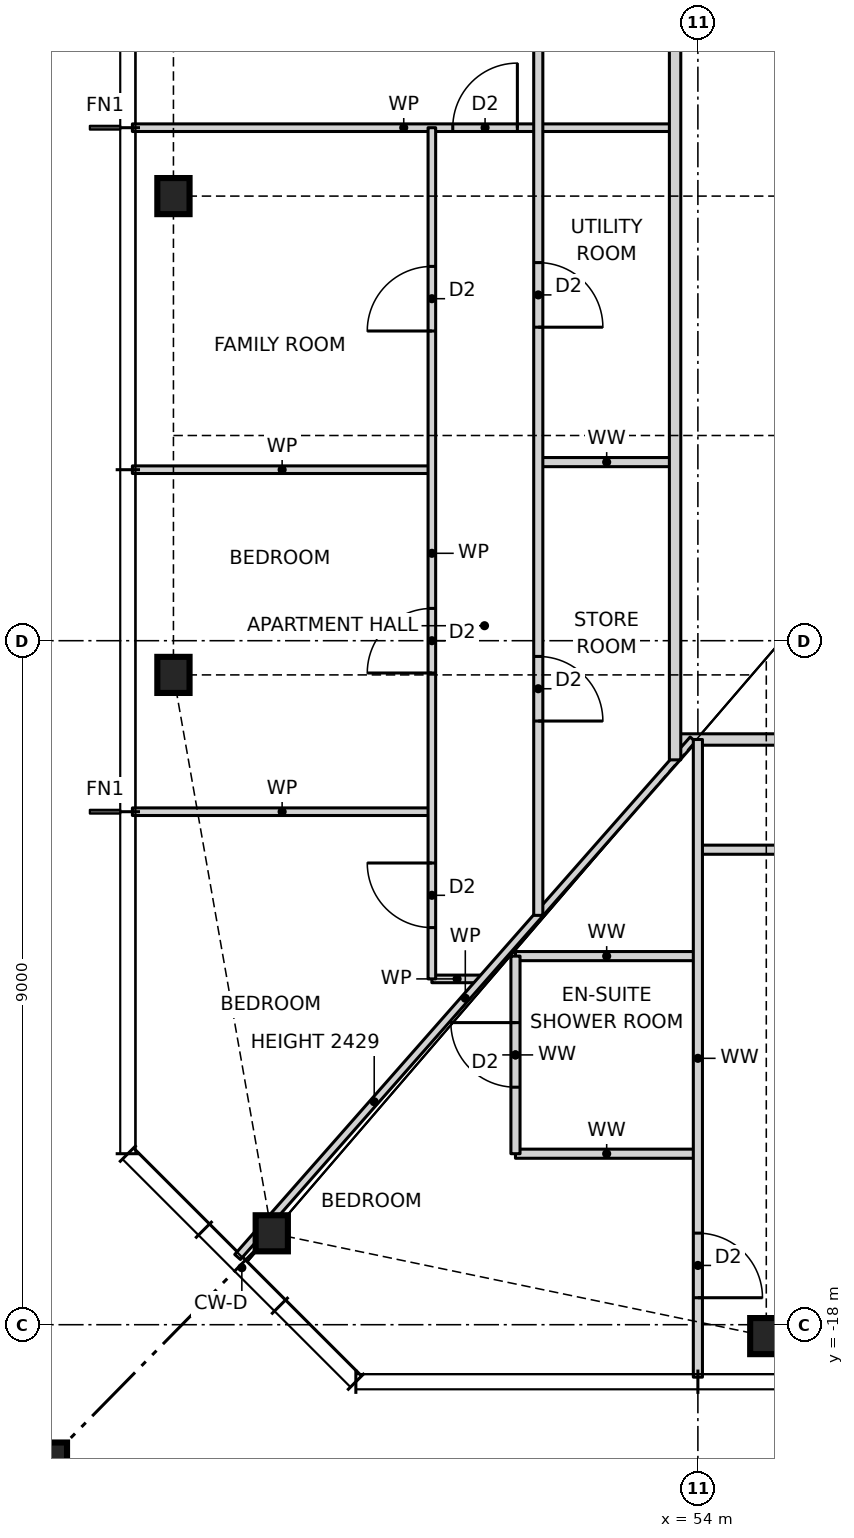
"""IFC4 building model, lengths in metres.
Left out: names, types, materials, properties, quantities, classifications, styles, units other than length and angle.
Written with IfcOpenShell. Run it as: python <this file> out.ifc"""

import sys

from ifc_helpers import new_model, si_unit, direction, frame, frame_2d, origin, origin_2d, place, context, subcontext, project, spatial, rectangle, hollow_rectangle, i_section, extrude, element, fill, save


model = new_model("IFC4")
c1 = context("Model", 3, precision=1e-05, world=origin(), true_north=direction((0.0, 1.0)))
c2 = subcontext(c1, "Body", "Model", "MODEL_VIEW")
j1 = project(units=[si_unit("LENGTHUNIT", "METRE"), si_unit("PLANEANGLEUNIT", "RADIAN")], contexts=[c1])
p1 = place(None, origin())
s1 = spatial("IfcSite", under=j1, at=p1, CompositionType="ELEMENT")
p2 = place(p1, origin())
s2 = spatial("IfcBuilding", under=s1, at=p2, CompositionType="ELEMENT")
p3 = place(p2, frame((0.0, 0.0, 29.0)))
s3 = spatial("IfcBuildingStorey", under=s2, at=p3, CompositionType="ELEMENT", Elevation=29.0)
for number, where, z_axis, x_axis in (
    (1, (48.394, -16.797, 0.0), (0.0, 0.0, 1.0), (1.0, 0.0, 0.0)),
    (2, (54.9, -18.15, 0.0), (0.0, 0.0, 1.0), (1.0, 0.0, 0.0)),
    (3, (47.1, -3.15, 0.0), (0.0, 0.0, 1.0), (1.0, 0.0, 0.0)),
    (4, (47.1, -9.45, 0.0), (0.0, 0.0, 1.0), (1.0, 0.0, 0.0)),
):
    element("IfcColumn", number, at=place(p3, frame(where, z_axis=z_axis, x_axis=x_axis)), inside=s3, PredefinedType="COLUMN", context=c2, shape_type="SweptSolid", body=[
        extrude(i_section(OverallWidth=0.424, OverallDepth=0.475, WebThickness=0.048, FlangeThickness=0.077, at=origin_2d()), origin(), (0.0, 0.0, 1.0), 3.5),
    ])
p4 = place(p3, frame((45.1, -20.15, 0.0), z_axis=(0.0, 0.0, 1.0), x_axis=(1.0, 0.0, 0.0)))
e5 = element("IfcColumn", 5, at=p4, inside=s3, PredefinedType="COLUMN", context=c2, shape_type="SweptSolid", body=[
    extrude(hollow_rectangle(XDim=1.2, YDim=1.2, WallThickness=0.07, at=origin_2d()), origin(), (0.0, 0.0, 1.0), 3.5),
])
p5 = place(p3, frame((51.6, -15.75, 0.0), z_axis=(0.0, 0.0, 1.0), x_axis=(1.0, 0.0, 0.0)))
e6 = element("IfcWall", 6, at=p5, inside=s3, PredefinedType="PARTITIONING", context=c2, shape_type="SweptSolid", body=[
    extrude(rectangle(XDim=2.4, YDim=0.12, at=frame_2d((1.2, 0.0))), origin(), (0.0, 0.0, 1.0), 3.27),
])
p6 = place(p3, frame((50.5, -13.45, 0.0), z_axis=(0.0, 0.0, 1.0), x_axis=(1.0, 0.0, 0.0)))
e7 = element("IfcWall", 7, at=p6, inside=s3, PredefinedType="PARTITIONING", context=c2, shape_type="SweptSolid", body=[
    extrude(rectangle(XDim=0.664, YDim=0.1, at=frame_2d((0.332, 0.0))), origin(), (0.0, 0.0, 1.0), 3.27),
])
p7 = place(p3, frame((51.6, -13.15, 0.0), z_axis=(0.0, 0.0, 1.0), x_axis=(1.0, 0.0, 0.0)))
e8 = element("IfcWall", 8, at=p7, inside=s3, PredefinedType="PARTITIONING", context=c2, shape_type="SweptSolid", body=[
    extrude(rectangle(XDim=2.4, YDim=0.12, at=frame_2d((1.2, 0.0))), origin(), (0.0, 0.0, 1.0), 3.27),
])
p8 = place(p3, frame((54.0, -11.75, 0.0), z_axis=(0.0, 0.0, 1.0), x_axis=(1.0, 0.0, 0.0)))
e9 = element("IfcWall", 9, at=p8, inside=s3, PredefinedType="PARTITIONING", context=c2, shape_type="SweptSolid", body=[
    extrude(rectangle(XDim=19.34, YDim=0.12, at=frame_2d((9.67, 0.0))), origin(), (0.0, 0.0, 1.0), 3.27),
])
p9 = place(p8, frame((1.375, 0.0, 0.0)))
e10 = element("IfcOpeningElement", 10, at=p9, cuts=e9, PredefinedType="OPENING", context=c2, shape_type="SweptSolid", body=[
    extrude(rectangle(XDim=0.85, YDim=2.1, at=frame_2d((0.425, 1.05))), frame((0.0, 0.07, 0.0), z_axis=(0.0, -1.0, 0.0), x_axis=(1.0, 0.0, 0.0)), (0.0, 0.0, 1.0), 0.14),
])
p10 = place(p8, frame((4.575, 0.0, 0.0)))
e11 = element("IfcOpeningElement", 11, at=p10, cuts=e9, PredefinedType="OPENING", context=c2, shape_type="SweptSolid", body=[
    extrude(rectangle(XDim=0.85, YDim=2.1, at=frame_2d((0.425, 1.05))), frame((0.0, 0.07, 0.0), z_axis=(0.0, -1.0, 0.0), x_axis=(1.0, 0.0, 0.0)), (0.0, 0.0, 1.0), 0.14),
])
p11 = place(p8, frame((11.325, 0.0, 0.0)))
e12 = element("IfcOpeningElement", 12, at=p11, cuts=e9, PredefinedType="OPENING", context=c2, shape_type="SweptSolid", body=[
    extrude(rectangle(XDim=0.85, YDim=2.1, at=frame_2d((0.425, 1.05))), frame((0.0, 0.07, 0.0), z_axis=(0.0, -1.0, 0.0), x_axis=(1.0, 0.0, 0.0)), (0.0, 0.0, 1.0), 0.14),
])
p12 = place(p8, frame((16.495, 0.0, 0.0)))
e13 = element("IfcOpeningElement", 13, at=p12, cuts=e9, PredefinedType="OPENING", context=c2, shape_type="SweptSolid", body=[
    extrude(rectangle(XDim=0.85, YDim=2.1, at=frame_2d((0.425, 1.05))), frame((0.0, 0.07, 0.0), z_axis=(0.0, -1.0, 0.0), x_axis=(1.0, 0.0, 0.0)), (0.0, 0.0, 1.0), 0.14),
])
p13 = place(p3, frame((46.56, -11.25, 0.0), z_axis=(0.0, 0.0, 1.0), x_axis=(1.0, 0.0, 0.0)))
e14 = element("IfcWall", 14, at=p13, inside=s3, PredefinedType="PARTITIONING", context=c2, shape_type="SweptSolid", body=[
    extrude(rectangle(XDim=3.94, YDim=0.1, at=frame_2d((1.97, 0.0))), origin(), (0.0, 0.0, 1.0), 3.27),
])
p14 = place(p3, frame((53.7, -10.3, 0.0), z_axis=(0.0, 0.0, 1.0), x_axis=(1.0, 0.0, 0.0)))
e15 = element("IfcWall", 15, at=p14, inside=s3, PredefinedType="PARTITIONING", context=c2, shape_type="SweptSolid", body=[
    extrude(rectangle(XDim=18.6, YDim=0.15, at=frame_2d((9.3, 0.0))), origin(), (0.0, 0.0, 1.0), 3.27),
])
p15 = place(p14, frame((4.8, 0.0, 0.0)))
e16 = element("IfcOpeningElement", 16, at=p15, cuts=e15, PredefinedType="OPENING", context=c2, shape_type="SweptSolid", body=[
    extrude(rectangle(XDim=1.0, YDim=2.1, at=frame_2d((0.5, 1.05))), frame((0.0, 0.085, 0.0), z_axis=(0.0, -1.0, 0.0), x_axis=(1.0, 0.0, 0.0)), (0.0, 0.0, 1.0), 0.17),
])
p16 = place(p3, frame((46.56, -6.75, 0.0), z_axis=(0.0, 0.0, 1.0), x_axis=(1.0, 0.0, 0.0)))
e17 = element("IfcWall", 17, at=p16, inside=s3, PredefinedType="PARTITIONING", context=c2, shape_type="SweptSolid", body=[
    extrude(rectangle(XDim=3.94, YDim=0.1, at=frame_2d((1.97, 0.0))), origin(), (0.0, 0.0, 1.0), 3.27),
])
p17 = place(p3, frame((51.9, -6.65, 0.0), z_axis=(0.0, 0.0, 1.0), x_axis=(1.0, 0.0, 0.0)))
e18 = element("IfcWall", 18, at=p17, inside=s3, PredefinedType="PARTITIONING", context=c2, shape_type="SweptSolid", body=[
    extrude(rectangle(XDim=1.8, YDim=0.12, at=frame_2d((0.9, 0.0))), origin(), (0.0, 0.0, 1.0), 3.27),
])
p18 = place(p3, frame((46.56, -2.25, 0.0), z_axis=(0.0, 0.0, 1.0), x_axis=(1.0, 0.0, 0.0)))
e19 = element("IfcWall", 19, at=p18, inside=s3, PredefinedType="PARTITIONING", context=c2, shape_type="SweptSolid", body=[
    extrude(rectangle(XDim=7.14, YDim=0.1, at=frame_2d((3.57, 0.0))), origin(), (0.0, 0.0, 1.0), 3.27),
])
p19 = place(p18, frame((4.215, 0.0, 0.0)))
e20 = element("IfcOpeningElement", 20, at=p19, cuts=e19, PredefinedType="OPENING", context=c2, shape_type="SweptSolid", body=[
    extrude(rectangle(XDim=0.85, YDim=2.1, at=frame_2d((0.425, 1.05))), frame((0.0, 0.06, 0.0), z_axis=(0.0, -1.0, 0.0), x_axis=(1.0, 0.0, 0.0)), (0.0, 0.0, 1.0), 0.12),
])
p20 = place(p3, frame((47.944, -17.109, 0.0), z_axis=(0.0, 0.0, 1.0), x_axis=(0.660638210404, 0.750704439146, 0.0)))
e21 = element("IfcWall", 21, at=p20, inside=s3, PredefinedType="PARTITIONING", context=c2, shape_type="SweptSolid", body=[
    extrude(rectangle(XDim=9.07, YDim=0.1, at=frame_2d((4.535, 0.0))), origin(), (0.0, 0.0, 1.0), 2.429),
])
p21 = place(p3, frame((54.0, -18.69, 0.0), z_axis=(0.0, 0.0, 1.0), x_axis=(0.0, 1.0, 0.0)))
e22 = element("IfcWall", 22, at=p21, inside=s3, PredefinedType="PARTITIONING", context=c2, shape_type="SweptSolid", body=[
    extrude(rectangle(XDim=8.39, YDim=0.12, at=frame_2d((4.195, 0.0))), origin(), (0.0, 0.0, 1.0), 3.27),
])
p22 = place(p21, frame((1.045, 0.0, 0.0)))
e23 = element("IfcOpeningElement", 23, at=p22, cuts=e22, PredefinedType="OPENING", context=c2, shape_type="SweptSolid", body=[
    extrude(rectangle(XDim=0.85, YDim=2.1, at=frame_2d((0.425, 1.05))), frame((0.0, 0.07, 0.0), z_axis=(0.0, -1.0, 0.0), x_axis=(1.0, 0.0, 0.0)), (0.0, 0.0, 1.0), 0.14),
])
p23 = place(p3, frame((53.7, -10.568, 0.0), z_axis=(0.0, 0.0, 1.0), x_axis=(0.0, 1.0, 0.0)))
e24 = element("IfcWall", 24, at=p23, inside=s3, PredefinedType="PARTITIONING", context=c2, shape_type="SweptSolid", body=[
    extrude(rectangle(XDim=21.136, YDim=0.15, at=frame_2d((10.568, 0.0))), origin(), (0.0, 0.0, 1.0), 3.27),
])
p24 = place(p23, frame((11.818, 0.0, 0.0)))
e25 = element("IfcOpeningElement", 25, at=p24, cuts=e24, PredefinedType="OPENING", context=c2, shape_type="SweptSolid", body=[
    extrude(rectangle(XDim=1.0, YDim=2.1, at=frame_2d((0.5, 1.05))), frame((0.0, 0.085, 0.0), z_axis=(0.0, -1.0, 0.0), x_axis=(1.0, 0.0, 0.0)), (0.0, 0.0, 1.0), 0.17),
])
p25 = place(p3, frame((51.9, -12.614, 0.0), z_axis=(0.0, 0.0, 1.0), x_axis=(0.0, 1.0, 0.0)))
e26 = element("IfcWall", 26, at=p25, inside=s3, PredefinedType="PARTITIONING", context=c2, shape_type="SweptSolid", body=[
    extrude(rectangle(XDim=25.228, YDim=0.12, at=frame_2d((12.614, 0.0))), origin(), (0.0, 0.0, 1.0), 3.27),
])
p26 = place(p25, frame((17.139, 0.0, 0.0)))
e27 = element("IfcOpeningElement", 27, at=p26, cuts=e26, PredefinedType="OPENING", context=c2, shape_type="SweptSolid", body=[
    extrude(rectangle(XDim=0.85, YDim=2.1, at=frame_2d((0.425, 1.05))), frame((0.0, 0.07, 0.0), z_axis=(0.0, -1.0, 0.0), x_axis=(1.0, 0.0, 0.0)), (0.0, 0.0, 1.0), 0.14),
])
p27 = place(p25, frame((13.939, 0.0, 0.0)))
e28 = element("IfcOpeningElement", 28, at=p27, cuts=e26, PredefinedType="OPENING", context=c2, shape_type="SweptSolid", body=[
    extrude(rectangle(XDim=0.85, YDim=2.1, at=frame_2d((0.425, 1.05))), frame((0.0, 0.07, 0.0), z_axis=(0.0, -1.0, 0.0), x_axis=(1.0, 0.0, 0.0)), (0.0, 0.0, 1.0), 0.14),
])
p28 = place(p25, frame((21.871, 0.0, 0.0)))
e29 = element("IfcOpeningElement", 29, at=p28, cuts=e26, PredefinedType="OPENING", context=c2, shape_type="SweptSolid", body=[
    extrude(rectangle(XDim=0.85, YDim=2.1, at=frame_2d((0.425, 1.05))), frame((0.0, 0.07, 0.0), z_axis=(0.0, -1.0, 0.0), x_axis=(1.0, 0.0, 0.0)), (0.0, 0.0, 1.0), 0.14),
])
p29 = place(p25, frame((7.739, 0.0, 0.0)))
e30 = element("IfcOpeningElement", 30, at=p29, cuts=e26, PredefinedType="OPENING", context=c2, shape_type="SweptSolid", body=[
    extrude(rectangle(XDim=0.85, YDim=2.1, at=frame_2d((0.425, 1.05))), frame((0.0, 0.07, 0.0), z_axis=(0.0, -1.0, 0.0), x_axis=(1.0, 0.0, 0.0)), (0.0, 0.0, 1.0), 0.14),
])
p30 = place(p25, frame((2.557, 0.0, 0.0)))
e31 = element("IfcOpeningElement", 31, at=p30, cuts=e26, PredefinedType="OPENING", context=c2, shape_type="SweptSolid", body=[
    extrude(rectangle(XDim=0.85, YDim=2.1, at=frame_2d((0.425, 1.05))), frame((0.0, 0.07, 0.0), z_axis=(0.0, -1.0, 0.0), x_axis=(1.0, 0.0, 0.0)), (0.0, 0.0, 1.0), 0.14),
])
p31 = place(p3, frame((51.6, -15.75, 0.0), z_axis=(0.0, 0.0, 1.0), x_axis=(0.0, 1.0, 0.0)))
e32 = element("IfcWall", 32, at=p31, inside=s3, PredefinedType="PARTITIONING", context=c2, shape_type="SweptSolid", body=[
    extrude(rectangle(XDim=2.6, YDim=0.12, at=frame_2d((1.3, 0.0))), origin(), (0.0, 0.0, 1.0), 3.27),
])
p32 = place(p31, frame((0.875, 0.0, 0.0)))
e33 = element("IfcOpeningElement", 33, at=p32, cuts=e32, PredefinedType="OPENING", context=c2, shape_type="SweptSolid", body=[
    extrude(rectangle(XDim=0.85, YDim=2.1, at=frame_2d((0.425, 1.05))), frame((0.0, 0.07, 0.0), z_axis=(0.0, -1.0, 0.0), x_axis=(1.0, 0.0, 0.0)), (0.0, 0.0, 1.0), 0.14),
])
p33 = place(p3, frame((50.5, -13.45, 0.0), z_axis=(0.0, 0.0, 1.0), x_axis=(0.0, 1.0, 0.0)))
e34 = element("IfcWall", 34, at=p33, inside=s3, PredefinedType="PARTITIONING", context=c2, shape_type="SweptSolid", body=[
    extrude(rectangle(XDim=11.2, YDim=0.1, at=frame_2d((5.6, 0.0))), origin(), (0.0, 0.0, 1.0), 3.27),
])
p34 = place(p33, frame((8.525, 0.0, 0.0)))
e35 = element("IfcOpeningElement", 35, at=p34, cuts=e34, PredefinedType="OPENING", context=c2, shape_type="SweptSolid", body=[
    extrude(rectangle(XDim=0.85, YDim=2.1, at=frame_2d((0.425, 1.05))), frame((0.0, 0.06, 0.0), z_axis=(0.0, -1.0, 0.0), x_axis=(1.0, 0.0, 0.0)), (0.0, 0.0, 1.0), 0.12),
])
p35 = place(p33, frame((4.025, 0.0, 0.0)))
e36 = element("IfcOpeningElement", 36, at=p35, cuts=e34, PredefinedType="OPENING", context=c2, shape_type="SweptSolid", body=[
    extrude(rectangle(XDim=0.85, YDim=2.1, at=frame_2d((0.425, 1.05))), frame((0.0, 0.06, 0.0), z_axis=(0.0, -1.0, 0.0), x_axis=(1.0, 0.0, 0.0)), (0.0, 0.0, 1.0), 0.12),
])
p36 = place(p33, frame((0.675, 0.0, 0.0)))
e37 = element("IfcOpeningElement", 37, at=p36, cuts=e34, PredefinedType="OPENING", context=c2, shape_type="SweptSolid", body=[
    extrude(rectangle(XDim=0.85, YDim=2.1, at=frame_2d((0.425, 1.05))), frame((0.0, 0.06, 0.0), z_axis=(0.0, -1.0, 0.0), x_axis=(1.0, 0.0, 0.0)), (0.0, 0.0, 1.0), 0.12),
])
p37 = place(p32, origin())
e38 = element("IfcDoor", 38, at=p37, inside=s3, OperationType="SINGLE_SWING_RIGHT", PredefinedType="DOOR", context=c2, shape_type="SweptSolid", body=[
    extrude(rectangle(XDim=0.85, YDim=2.1, at=frame_2d((0.425, 1.05))), frame((0.0, 0.025, 0.0), z_axis=(0.0, -1.0, 0.0), x_axis=(1.0, 0.0, 0.0)), (0.0, 0.0, 1.0), 0.05),
])
fill(e33, e38)
p38 = place(p22, frame((0.85, 0.0, 0.0), z_axis=(0.0, 0.0, 1.0), x_axis=(-1.0, 0.0, 0.0)))
e39 = element("IfcDoor", 39, at=p38, inside=s3, OperationType="SINGLE_SWING_RIGHT", PredefinedType="DOOR", context=c2, shape_type="SweptSolid", body=[
    extrude(rectangle(XDim=0.85, YDim=2.1, at=frame_2d((0.425, 1.05))), frame((0.0, 0.025, 0.0), z_axis=(0.0, -1.0, 0.0), x_axis=(1.0, 0.0, 0.0)), (0.0, 0.0, 1.0), 0.05),
])
fill(e23, e39)
p39 = place(p19, origin())
e40 = element("IfcDoor", 40, at=p39, inside=s3, OperationType="SINGLE_SWING_RIGHT", PredefinedType="DOOR", context=c2, shape_type="SweptSolid", body=[
    extrude(rectangle(XDim=0.85, YDim=2.1, at=frame_2d((0.425, 1.05))), frame((0.0, 0.025, 0.0), z_axis=(0.0, -1.0, 0.0), x_axis=(1.0, 0.0, 0.0)), (0.0, 0.0, 1.0), 0.05),
])
fill(e20, e40)
p40 = place(p34, origin())
e41 = element("IfcDoor", 41, at=p40, inside=s3, OperationType="SINGLE_SWING_LEFT", PredefinedType="DOOR", context=c2, shape_type="SweptSolid", body=[
    extrude(rectangle(XDim=0.85, YDim=2.1, at=frame_2d((0.425, 1.05))), frame((0.0, 0.025, 0.0), z_axis=(0.0, -1.0, 0.0), x_axis=(1.0, 0.0, 0.0)), (0.0, 0.0, 1.0), 0.05),
])
fill(e35, e41)
p41 = place(p35, origin())
e42 = element("IfcDoor", 42, at=p41, inside=s3, OperationType="SINGLE_SWING_LEFT", PredefinedType="DOOR", context=c2, shape_type="SweptSolid", body=[
    extrude(rectangle(XDim=0.85, YDim=2.1, at=frame_2d((0.425, 1.05))), frame((0.0, 0.025, 0.0), z_axis=(0.0, -1.0, 0.0), x_axis=(1.0, 0.0, 0.0)), (0.0, 0.0, 1.0), 0.05),
])
fill(e36, e42)
p42 = place(p36, origin())
e43 = element("IfcDoor", 43, at=p42, inside=s3, OperationType="SINGLE_SWING_RIGHT", PredefinedType="DOOR", context=c2, shape_type="SweptSolid", body=[
    extrude(rectangle(XDim=0.85, YDim=2.1, at=frame_2d((0.425, 1.05))), frame((0.0, 0.025, 0.0), z_axis=(0.0, -1.0, 0.0), x_axis=(1.0, 0.0, 0.0)), (0.0, 0.0, 1.0), 0.05),
])
fill(e37, e43)
p43 = place(p29, frame((0.85, 0.0, 0.0), z_axis=(0.0, 0.0, 1.0), x_axis=(-1.0, 0.0, 0.0)))
e44 = element("IfcDoor", 44, at=p43, inside=s3, OperationType="SINGLE_SWING_RIGHT", PredefinedType="DOOR", context=c2, shape_type="SweptSolid", body=[
    extrude(rectangle(XDim=0.85, YDim=2.1, at=frame_2d((0.425, 1.05))), frame((0.0, 0.025, 0.0), z_axis=(0.0, -1.0, 0.0), x_axis=(1.0, 0.0, 0.0)), (0.0, 0.0, 1.0), 0.05),
])
fill(e30, e44)
p44 = place(p30, frame((0.85, 0.0, 0.0), z_axis=(0.0, 0.0, 1.0), x_axis=(-1.0, 0.0, 0.0)))
e45 = element("IfcDoor", 45, at=p44, inside=s3, OperationType="SINGLE_SWING_RIGHT", PredefinedType="DOOR", context=c2, shape_type="SweptSolid", body=[
    extrude(rectangle(XDim=0.85, YDim=2.1, at=frame_2d((0.425, 1.05))), frame((0.0, 0.025, 0.0), z_axis=(0.0, -1.0, 0.0), x_axis=(1.0, 0.0, 0.0)), (0.0, 0.0, 1.0), 0.05),
])
fill(e31, e45)
save(model, sys.argv[1])
